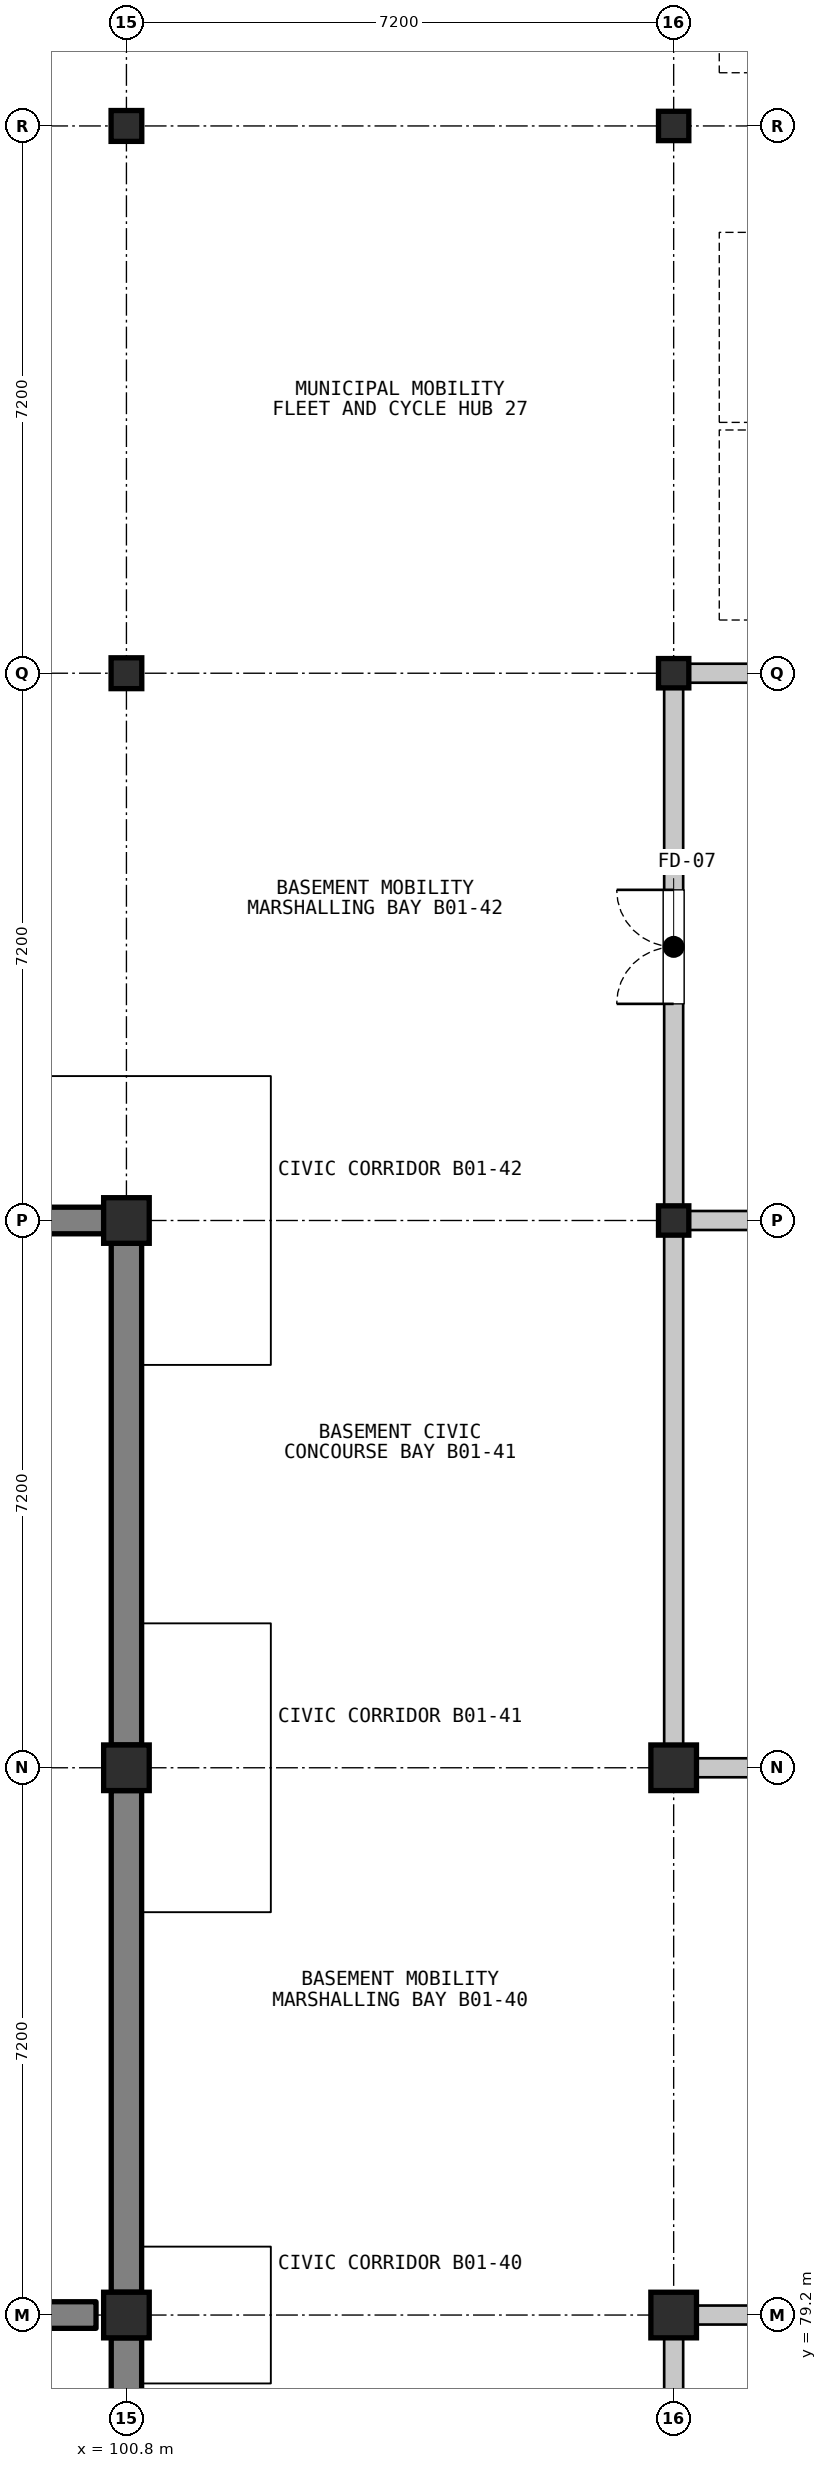
"""IFC4 building model, lengths in metres.
Left out: names, types, materials, properties, quantities, classifications, styles, units other than length and angle.
Written with IfcOpenShell. Run it as: python <this file> out.ifc"""

import sys

from ifc_helpers import new_model, si_unit, direction, frame, frame_2d, origin, origin_2d, place, context, subcontext, project, spatial, rectangle, i_section, extrude, element, fill, save


model = new_model("IFC4")
c1 = context("Model", 3, precision=1e-05, world=origin(), true_north=direction((0.0, 1.0)))
c2 = subcontext(c1, "Body", "Model", "MODEL_VIEW")
j1 = project(units=[si_unit("LENGTHUNIT", "METRE"), si_unit("PLANEANGLEUNIT", "RADIAN")], contexts=[c1])
p1 = place(None, origin())
s1 = spatial("IfcSite", under=j1, at=p1, CompositionType="ELEMENT")
p2 = place(p1, origin())
s2 = spatial("IfcBuilding", under=s1, at=p2, CompositionType="ELEMENT")
p3 = place(p2, frame((0.0, 0.0, -4.2)))
s3 = spatial("IfcBuildingStorey", under=s2, at=p3, CompositionType="ELEMENT", Elevation=-4.2)
p4 = place(p3, frame((93.9, 93.6, 0.0), z_axis=(0.0, 0.0, 1.0), x_axis=(1.0, 0.0, 0.0)))
e1 = element("IfcWall", 1, at=p4, inside=s3, PredefinedType="USERDEFINED", context=c2, shape_type="SweptSolid", body=[
    extrude(rectangle(XDim=6.6, YDim=0.35, at=frame_2d((3.3, 0.0))), origin(), (0.0, 0.0, 1.0), 3.98),
])
p5 = place(p3, frame((100.8, 72.3, 0.0), z_axis=(0.0, 0.0, 1.0), x_axis=(0.0, 1.0, 0.0)))
e2 = element("IfcWall", 2, at=p5, inside=s3, PredefinedType="USERDEFINED", context=c2, shape_type="SweptSolid", body=[
    extrude(rectangle(XDim=6.6, YDim=0.4, at=frame_2d((3.3, 0.0))), origin(), (0.0, 0.0, 1.0), 3.98),
])
for number, where, z_axis, x_axis in (
    (3, (100.8, 79.5, 0.0), (0.0, 0.0, 1.0), (0.0, 1.0, 0.0)),
    (4, (100.8, 86.7, 0.0), (0.0, 0.0, 1.0), (0.0, 1.0, 0.0)),
):
    element("IfcWall", number, at=place(p3, frame(where, z_axis=z_axis, x_axis=x_axis)), inside=s3, PredefinedType="USERDEFINED", context=c2, shape_type="SweptSolid", body=[
        extrude(rectangle(XDim=6.6, YDim=0.4, at=frame_2d((3.3, 0.0))), origin(), (0.0, 0.0, 1.0), 3.98),
    ])
p6 = place(p3, frame((94.0, 79.2, 0.0), z_axis=(0.0, 0.0, 1.0), x_axis=(1.0, 0.0, 0.0)))
e5 = element("IfcWall", 5, at=p6, inside=s3, PredefinedType="USERDEFINED", context=c2, shape_type="SweptSolid", body=[
    extrude(rectangle(XDim=6.4, YDim=0.35, at=frame_2d((3.2, 0.0))), origin(), (0.0, 0.0, 1.0), 3.98),
])
for number, where, z_axis, x_axis in (
    (6, (100.8, 79.2, 0.0), (0.0, 0.0, 1.0), (1.0, 0.0, 0.0)),
    (7, (100.8, 86.4, 0.0), (0.0, 0.0, 1.0), (1.0, 0.0, 0.0)),
    (8, (100.8, 93.6, 0.0), (0.0, 0.0, 1.0), (1.0, 0.0, 0.0)),
):
    element("IfcColumn", number, at=place(p3, frame(where, z_axis=z_axis, x_axis=x_axis)), inside=s3, PredefinedType="COLUMN", context=c2, shape_type="SweptSolid", body=[
        extrude(rectangle(XDim=0.6, YDim=0.6, at=origin_2d()), origin(), (0.0, 0.0, 1.0), 4.2),
    ])
for number, where, z_axis, x_axis in (
    (9, (100.8, 100.8, 0.0), (0.0, 0.0, 1.0), (1.0, 0.0, 0.0)),
    (10, (100.8, 108.0, 0.0), (0.0, 0.0, 1.0), (1.0, 0.0, 0.0)),
):
    element("IfcColumn", number, at=place(p3, frame(where, z_axis=z_axis, x_axis=x_axis)), inside=s3, PredefinedType="COLUMN", context=c2, shape_type="SweptSolid", body=[
        extrude(i_section(OverallWidth=0.404, OverallDepth=0.406, WebThickness=0.027, FlangeThickness=0.044, FilletRadius=0.015, at=origin_2d()), origin(), (0.0, 0.0, 1.0), 4.2),
    ])
for number, where, z_axis, x_axis in (
    (11, (108.0, 79.2, 0.0), (0.0, 0.0, 1.0), (1.0, 0.0, 0.0)),
    (12, (108.0, 86.4, 0.0), (0.0, 0.0, 1.0), (1.0, 0.0, 0.0)),
):
    element("IfcColumn", number, at=place(p3, frame(where, z_axis=z_axis, x_axis=x_axis)), inside=s3, PredefinedType="COLUMN", context=c2, shape_type="SweptSolid", body=[
        extrude(rectangle(XDim=0.6, YDim=0.6, at=origin_2d()), origin(), (0.0, 0.0, 1.0), 4.2),
    ])
for number, where, z_axis, x_axis in (
    (13, (108.0, 93.6, 0.0), (0.0, 0.0, 1.0), (1.0, 0.0, 0.0)),
    (14, (108.0, 100.8, 0.0), (0.0, 0.0, 1.0), (1.0, 0.0, 0.0)),
    (15, (108.0, 108.0, 0.0), (0.0, 0.0, 1.0), (1.0, 0.0, 0.0)),
):
    element("IfcColumn", number, at=place(p3, frame(where, z_axis=z_axis, x_axis=x_axis)), inside=s3, PredefinedType="COLUMN", context=c2, shape_type="SweptSolid", body=[
        extrude(i_section(OverallWidth=0.399, OverallDepth=0.386, WebThickness=0.021, FlangeThickness=0.033, FilletRadius=0.015, at=origin_2d()), origin(), (0.0, 0.0, 1.0), 4.2),
    ])
p7 = place(p3, frame((108.12, 79.2, 0.0), z_axis=(0.0, 0.0, 1.0), x_axis=(1.0, 0.0, 0.0)))
e16 = element("IfcWall", 16, at=p7, inside=s3, PredefinedType="PARTITIONING", context=c2, shape_type="SweptSolid", body=[
    extrude(rectangle(XDim=6.8, YDim=0.25, at=frame_2d((3.4, 0.0))), origin(), (0.0, 0.0, 1.0), 3.208),
])
p8 = place(p7, frame((2.65, 0.0, 0.0)))
e17 = element("IfcOpeningElement", 17, at=p8, cuts=e16, PredefinedType="OPENING", context=c2, shape_type="SweptSolid", body=[
    extrude(rectangle(XDim=1.5, YDim=2.25, at=frame_2d((0.75, 1.125))), frame((0.0, 0.135, 0.0), z_axis=(0.0, -1.0, 0.0), x_axis=(1.0, 0.0, 0.0)), (0.0, 0.0, 1.0), 0.27),
])
p9 = place(p3, frame((108.0, 72.12, 0.0), z_axis=(0.0, 0.0, 1.0), x_axis=(0.0, 1.0, 0.0)))
e18 = element("IfcWall", 18, at=p9, inside=s3, PredefinedType="PARTITIONING", context=c2, shape_type="SweptSolid", body=[
    extrude(rectangle(XDim=6.96, YDim=0.25, at=frame_2d((3.48, 0.0))), origin(), (0.0, 0.0, 1.0), 3.208),
])
p10 = place(p3, frame((114.92, 86.4, 0.0), z_axis=(0.0, 0.0, 1.0), x_axis=(-1.0, 0.0, 0.0)))
e19 = element("IfcWall", 19, at=p10, inside=s3, PredefinedType="PARTITIONING", context=c2, shape_type="SweptSolid", body=[
    extrude(rectangle(XDim=6.8, YDim=0.25, at=frame_2d((3.4, 0.0))), origin(), (0.0, 0.0, 1.0), 3.208),
])
p11 = place(p10, frame((2.65, 0.0, 0.0)))
e20 = element("IfcOpeningElement", 20, at=p11, cuts=e19, PredefinedType="OPENING", context=c2, shape_type="SweptSolid", body=[
    extrude(rectangle(XDim=1.5, YDim=2.25, at=frame_2d((0.75, 1.125))), frame((0.0, 0.135, 0.0), z_axis=(0.0, -1.0, 0.0), x_axis=(1.0, 0.0, 0.0)), (0.0, 0.0, 1.0), 0.27),
])
p12 = place(p3, frame((108.12, 93.6, 0.0), z_axis=(0.0, 0.0, 1.0), x_axis=(1.0, 0.0, 0.0)))
e21 = element("IfcWall", 21, at=p12, inside=s3, PredefinedType="PARTITIONING", context=c2, shape_type="SweptSolid", body=[
    extrude(rectangle(XDim=6.8, YDim=0.25, at=frame_2d((3.4, 0.0))), origin(), (0.0, 0.0, 1.0), 3.368),
])
p13 = place(p3, frame((108.0, 86.52, 0.0), z_axis=(0.0, 0.0, 1.0), x_axis=(0.0, 1.0, 0.0)))
e22 = element("IfcWall", 22, at=p13, inside=s3, PredefinedType="PARTITIONING", context=c2, shape_type="SweptSolid", body=[
    extrude(rectangle(XDim=6.96, YDim=0.25, at=frame_2d((3.48, 0.0))), origin(), (0.0, 0.0, 1.0), 3.208),
])
p14 = place(p3, frame((108.0, 93.72, 0.0), z_axis=(0.0, 0.0, 1.0), x_axis=(0.0, 1.0, 0.0)))
e23 = element("IfcWall", 23, at=p14, inside=s3, PredefinedType="PARTITIONING", context=c2, shape_type="SweptSolid", body=[
    extrude(rectangle(XDim=6.96, YDim=0.25, at=frame_2d((3.48, 0.0))), origin(), (0.0, 0.0, 1.0), 3.368),
])
p15 = place(p14, frame((2.73, 0.0, 0.0)))
e24 = element("IfcOpeningElement", 24, at=p15, cuts=e23, PredefinedType="OPENING", context=c2, shape_type="SweptSolid", body=[
    extrude(rectangle(XDim=1.5, YDim=2.25, at=frame_2d((0.75, 1.125))), frame((0.0, 0.135, 0.0), z_axis=(0.0, -1.0, 0.0), x_axis=(1.0, 0.0, 0.0)), (0.0, 0.0, 1.0), 0.27),
])
p16 = place(p3, frame((108.12, 100.8, 0.0), z_axis=(0.0, 0.0, 1.0), x_axis=(1.0, 0.0, 0.0)))
e25 = element("IfcWall", 25, at=p16, inside=s3, PredefinedType="PARTITIONING", context=c2, shape_type="SweptSolid", body=[
    extrude(rectangle(XDim=6.96, YDim=0.25, at=frame_2d((3.48, 0.0))), origin(), (0.0, 0.0, 1.0), 3.368),
])
p17 = place(p15, origin())
e26 = element("IfcDoor", 26, at=p17, inside=s3, OperationType="DOUBLE_DOOR_SINGLE_SWING", PredefinedType="DOOR", context=c2, shape_type="SweptSolid", body=[
    extrude(rectangle(XDim=1.5, YDim=2.25, at=frame_2d((0.75, 1.125))), frame((0.0, 0.025, 0.0), z_axis=(0.0, -1.0, 0.0), x_axis=(1.0, 0.0, 0.0)), (0.0, 0.0, 1.0), 0.05),
])
fill(e24, e26)
save(model, sys.argv[1])
